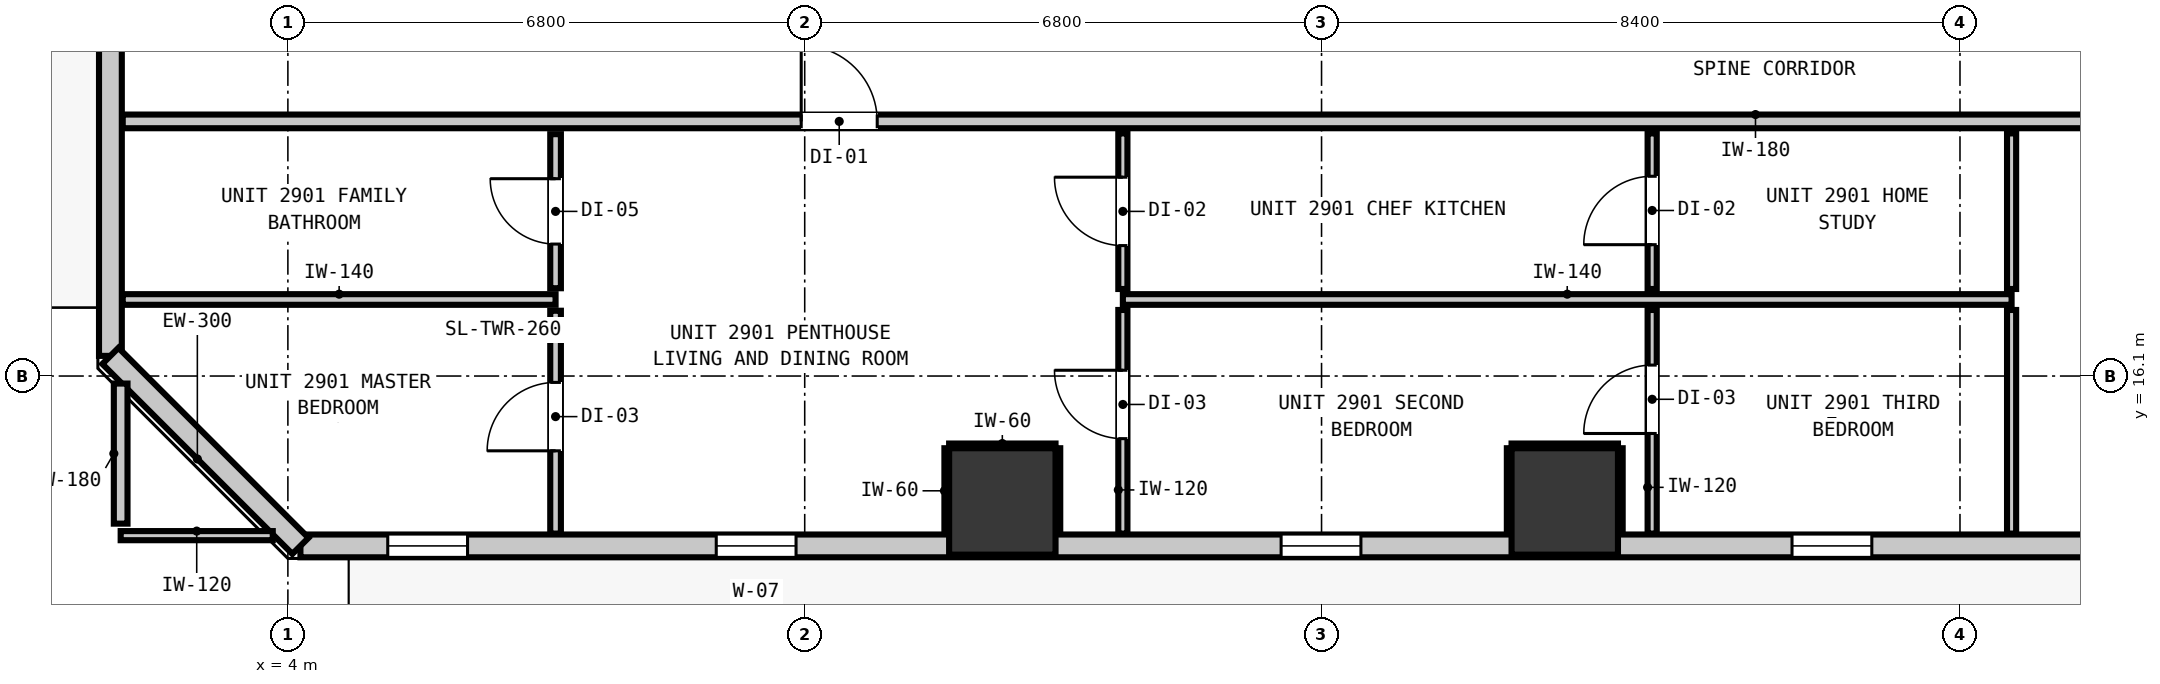
"""IFC4 building model, lengths in metres.
Left out: names, types, materials, properties, quantities, classifications, styles, units other than length and angle.
Written with IfcOpenShell. Run it as: python <this file> out.ifc"""

import sys

from ifc_helpers import new_model, si_unit, direction, frame, frame_2d, origin, origin_2d, place, context, subcontext, project, spatial, rectangle, extrude, element, fill, save


model = new_model("IFC4")
c1 = context("Model", 3, precision=1e-05, world=origin(), true_north=direction((0.0, 1.0)))
c2 = subcontext(c1, "Body", "Model", "MODEL_VIEW")
j1 = project(units=[si_unit("LENGTHUNIT", "METRE"), si_unit("PLANEANGLEUNIT", "RADIAN")], contexts=[c1])
p1 = place(None, origin())
s1 = spatial("IfcSite", under=j1, at=p1, CompositionType="ELEMENT")
p2 = place(p1, origin())
s2 = spatial("IfcBuilding", under=s1, at=p2, CompositionType="ELEMENT")
p3 = place(p2, frame((0.0, 0.0, 102.76)))
s3 = spatial("IfcBuildingStorey", under=s2, at=p3, CompositionType="ELEMENT", Elevation=102.76)
for number, where, z_axis, x_axis in (
    (1, (13.4, 14.45, 0.0), (0.0, 0.0, 1.0), (1.0, 0.0, 0.0)),
    (2, (20.8, 14.45, 0.0), (0.0, 0.0, 1.0), (1.0, 0.0, 0.0)),
):
    element("IfcColumn", number, at=place(p3, frame(where, z_axis=z_axis, x_axis=x_axis)), inside=s3, PredefinedType="COLUMN", context=c2, shape_type="SweptSolid", body=[
        extrude(rectangle(XDim=1.4, YDim=1.4, at=origin_2d()), origin(), (0.0, 0.0, 1.0), 2.9),
    ])
p4 = place(p3, frame((1.665, 16.365, 0.0), z_axis=(0.0, 0.0, 1.0), x_axis=(0.0, 1.0, 0.0)))
e3 = element("IfcWall", 3, at=p4, inside=s3, PredefinedType="STANDARD", context=c2, shape_type="SweptSolid", body=[
    extrude(rectangle(XDim=34.67, YDim=0.3, at=frame_2d((17.335, 0.0))), origin(), (0.0, 0.0, 1.0), 2.9),
])
p5 = place(p4, frame((8.955, 0.0, 0.0)))
e4 = element("IfcOpeningElement", 4, at=p5, cuts=e3, PredefinedType="OPENING", context=c2, shape_type="SweptSolid", body=[
    extrude(rectangle(XDim=1.0, YDim=2.15, at=frame_2d((0.5, 1.075))), frame((0.0, 0.16, 0.0), z_axis=(0.0, -1.0, 0.0), x_axis=(1.0, 0.0, 0.0)), (0.0, 0.0, 1.0), 0.32),
])
p6 = place(p4, frame((30.958, 0.0, 0.85)))
e5 = element("IfcOpeningElement", 5, at=p6, cuts=e3, PredefinedType="OPENING", context=c2, shape_type="SweptSolid", body=[
    extrude(rectangle(XDim=1.05, YDim=1.65, at=frame_2d((0.525, 0.825))), frame((0.0, 0.16, 0.0), z_axis=(0.0, -1.0, 0.0), x_axis=(1.0, 0.0, 0.0)), (0.0, 0.0, 1.0), 0.32),
])
p7 = place(p4, frame((10.88, 0.0, 0.85)))
e6 = element("IfcOpeningElement", 6, at=p7, cuts=e3, PredefinedType="OPENING", context=c2, shape_type="SweptSolid", body=[
    extrude(rectangle(XDim=1.05, YDim=1.65, at=frame_2d((0.525, 0.825))), frame((0.0, 0.16, 0.0), z_axis=(0.0, -1.0, 0.0), x_axis=(1.0, 0.0, 0.0)), (0.0, 0.0, 1.0), 0.32),
])
p8 = place(p4, frame((15.41, 0.0, 0.85)))
e7 = element("IfcOpeningElement", 7, at=p8, cuts=e3, PredefinedType="OPENING", context=c2, shape_type="SweptSolid", body=[
    extrude(rectangle(XDim=1.05, YDim=1.65, at=frame_2d((0.525, 0.825))), frame((0.0, 0.16, 0.0), z_axis=(0.0, -1.0, 0.0), x_axis=(1.0, 0.0, 0.0)), (0.0, 0.0, 1.0), 0.32),
])
p9 = place(p3, frame((41.635, 13.865, 0.0), z_axis=(0.0, 0.0, 1.0), x_axis=(-1.0, 0.0, 0.0)))
e8 = element("IfcWall", 8, at=p9, inside=s3, PredefinedType="STANDARD", context=c2, shape_type="SweptSolid", body=[
    extrude(rectangle(XDim=37.47, YDim=0.3, at=frame_2d((18.735, 0.0))), origin(), (0.0, 0.0, 1.0), 2.9),
])
p10 = place(p9, frame((0.901, 0.0, 0.0)))
e9 = element("IfcOpeningElement", 9, at=p10, cuts=e8, PredefinedType="OPENING", context=c2, shape_type="SweptSolid", body=[
    extrude(rectangle(XDim=1.0, YDim=2.15, at=frame_2d((0.5, 1.075))), frame((0.0, 0.16, 0.0), z_axis=(0.0, -1.0, 0.0), x_axis=(1.0, 0.0, 0.0)), (0.0, 0.0, 1.0), 0.32),
])
p11 = place(p9, frame((30.949, 0.0, 0.85)))
e10 = element("IfcOpeningElement", 10, at=p11, cuts=e8, PredefinedType="OPENING", context=c2, shape_type="SweptSolid", body=[
    extrude(rectangle(XDim=1.05, YDim=1.65, at=frame_2d((0.525, 0.825))), frame((0.0, 0.16, 0.0), z_axis=(0.0, -1.0, 0.0), x_axis=(1.0, 0.0, 0.0)), (0.0, 0.0, 1.0), 0.32),
])
p12 = place(p9, frame((35.271, 0.0, 0.85)))
e11 = element("IfcOpeningElement", 11, at=p12, cuts=e8, PredefinedType="OPENING", context=c2, shape_type="SweptSolid", body=[
    extrude(rectangle(XDim=1.05, YDim=1.65, at=frame_2d((0.525, 0.825))), frame((0.0, 0.16, 0.0), z_axis=(0.0, -1.0, 0.0), x_axis=(1.0, 0.0, 0.0)), (0.0, 0.0, 1.0), 0.32),
])
p13 = place(p9, frame((23.517, 0.0, 0.85)))
e12 = element("IfcOpeningElement", 12, at=p13, cuts=e8, PredefinedType="OPENING", context=c2, shape_type="SweptSolid", body=[
    extrude(rectangle(XDim=1.05, YDim=1.65, at=frame_2d((0.525, 0.825))), frame((0.0, 0.16, 0.0), z_axis=(0.0, -1.0, 0.0), x_axis=(1.0, 0.0, 0.0)), (0.0, 0.0, 1.0), 0.32),
])
p14 = place(p9, frame((16.795, 0.0, 0.85)))
e13 = element("IfcOpeningElement", 13, at=p14, cuts=e8, PredefinedType="OPENING", context=c2, shape_type="SweptSolid", body=[
    extrude(rectangle(XDim=1.05, YDim=1.65, at=frame_2d((0.525, 0.825))), frame((0.0, 0.16, 0.0), z_axis=(0.0, -1.0, 0.0), x_axis=(1.0, 0.0, 0.0)), (0.0, 0.0, 1.0), 0.32),
])
p15 = place(p9, frame((8.26, 0.0, 0.85)))
e14 = element("IfcOpeningElement", 14, at=p15, cuts=e8, PredefinedType="OPENING", context=c2, shape_type="SweptSolid", body=[
    extrude(rectangle(XDim=1.05, YDim=1.65, at=frame_2d((0.525, 0.825))), frame((0.0, 0.16, 0.0), z_axis=(0.0, -1.0, 0.0), x_axis=(1.0, 0.0, 0.0)), (0.0, 0.0, 1.0), 0.32),
])
p16 = place(p3, frame((4.165, 13.865, 0.0), z_axis=(0.0, 0.0, 1.0), x_axis=(-0.707106781187, 0.707106781187, 0.0)))
e15 = element("IfcWall", 15, at=p16, inside=s3, PredefinedType="STANDARD", context=c2, shape_type="SweptSolid", body=[
    extrude(rectangle(XDim=3.536, YDim=0.3, at=frame_2d((1.768, 0.0))), origin(), (0.0, 0.0, 1.0), 2.9),
])
p17 = place(p3, frame((1.827, 19.45, 0.0), z_axis=(0.0, 0.0, 1.0), x_axis=(1.0, 0.0, 0.0)))
e16 = element("IfcWall", 16, at=p17, inside=s3, PredefinedType="PARTITIONING", context=c2, shape_type="SweptSolid", body=[
    extrude(rectangle(XDim=42.146, YDim=0.18, at=frame_2d((21.073, 0.0))), origin(), (0.0, 0.0, 1.0), 2.9),
])
p18 = place(p17, frame((8.927, 0.0, 0.0)))
e17 = element("IfcOpeningElement", 17, at=p18, cuts=e16, PredefinedType="OPENING", context=c2, shape_type="SweptSolid", body=[
    extrude(rectangle(XDim=1.0, YDim=2.15, at=frame_2d((0.5, 1.075))), frame((0.0, 0.1, 0.0), z_axis=(0.0, -1.0, 0.0), x_axis=(1.0, 0.0, 0.0)), (0.0, 0.0, 1.0), 0.2),
])
p19 = place(p17, frame((33.038, 0.0, 0.0)))
e18 = element("IfcOpeningElement", 18, at=p19, cuts=e16, PredefinedType="OPENING", context=c2, shape_type="SweptSolid", body=[
    extrude(rectangle(XDim=0.9, YDim=2.1, at=frame_2d((0.45, 1.05))), frame((0.0, 0.1, 0.0), z_axis=(0.0, -1.0, 0.0), x_axis=(1.0, 0.0, 0.0)), (0.0, 0.0, 1.0), 0.2),
])
p20 = place(p3, frame((1.827, 17.107, 0.0), z_axis=(0.0, 0.0, 1.0), x_axis=(1.0, 0.0, 0.0)))
e19 = element("IfcWall", 19, at=p20, inside=s3, PredefinedType="PARTITIONING", context=c2, shape_type="SweptSolid", body=[
    extrude(rectangle(XDim=5.695, YDim=0.14, at=frame_2d((2.848, 0.0))), origin(), (0.0, 0.0, 1.0), 2.9),
])
p21 = place(p3, frame((14.986, 17.107, 0.0), z_axis=(0.0, 0.0, 1.0), x_axis=(1.0, 0.0, 0.0)))
e20 = element("IfcWall", 20, at=p21, inside=s3, PredefinedType="PARTITIONING", context=c2, shape_type="SweptSolid", body=[
    extrude(rectangle(XDim=11.693, YDim=0.14, at=frame_2d((5.846, 0.0))), origin(), (0.0, 0.0, 1.0), 2.9),
])
p22 = place(p3, frame((1.8, 14.0, 0.0), z_axis=(0.0, 0.0, 1.0), x_axis=(1.0, 0.0, 0.0)))
e21 = element("IfcWall", 21, at=p22, inside=s3, PredefinedType="PARTITIONING", context=c2, shape_type="SweptSolid", body=[
    extrude(rectangle(XDim=2.001, YDim=0.12, at=frame_2d((1.0, 0.0))), origin(), (0.0, 0.0, 1.0), 2.9),
])
p23 = place(p3, frame((1.8, 14.158, 0.0), z_axis=(0.0, 0.0, 1.0), x_axis=(0.0, 1.0, 0.0)))
e22 = element("IfcWall", 22, at=p23, inside=s3, PredefinedType="PARTITIONING", context=c2, shape_type="SweptSolid", body=[
    extrude(rectangle(XDim=1.843, YDim=0.18, at=frame_2d((0.921, 0.0))), origin(), (0.0, 0.0, 1.0), 2.9),
])
p24 = place(p3, frame((7.522, 14.027, 0.0), z_axis=(0.0, 0.0, 1.0), x_axis=(0.0, 1.0, 0.0)))
e23 = element("IfcWall", 23, at=p24, inside=s3, PredefinedType="PARTITIONING", context=c2, shape_type="SweptSolid", body=[
    extrude(rectangle(XDim=2.932, YDim=0.14, at=frame_2d((1.466, 0.0))), origin(), (0.0, 0.0, 1.0), 2.9),
])
p25 = place(p24, frame((1.089, 0.0, 0.0)))
e24 = element("IfcOpeningElement", 24, at=p25, cuts=e23, PredefinedType="OPENING", context=c2, shape_type="SweptSolid", body=[
    extrude(rectangle(XDim=0.9, YDim=2.1, at=frame_2d((0.45, 1.05))), frame((0.0, 0.08, 0.0), z_axis=(0.0, -1.0, 0.0), x_axis=(1.0, 0.0, 0.0)), (0.0, 0.0, 1.0), 0.16),
])
p26 = place(p3, frame((7.522, 17.255, 0.0), z_axis=(0.0, 0.0, 1.0), x_axis=(0.0, 1.0, 0.0)))
e25 = element("IfcWall", 25, at=p26, inside=s3, PredefinedType="PARTITIONING", context=c2, shape_type="SweptSolid", body=[
    extrude(rectangle(XDim=2.027, YDim=0.14, at=frame_2d((1.014, 0.0))), origin(), (0.0, 0.0, 1.0), 2.9),
])
p27 = place(p26, frame((0.581, 0.0, 0.0)))
e26 = element("IfcOpeningElement", 26, at=p27, cuts=e25, PredefinedType="OPENING", context=c2, shape_type="SweptSolid", body=[
    extrude(rectangle(XDim=0.86, YDim=2.02, at=frame_2d((0.43, 1.01))), frame((0.0, 0.08, 0.0), z_axis=(0.0, -1.0, 0.0), x_axis=(1.0, 0.0, 0.0)), (0.0, 0.0, 1.0), 0.16),
])
p28 = place(p3, frame((14.986, 14.027, 0.0), z_axis=(0.0, 0.0, 1.0), x_axis=(0.0, 1.0, 0.0)))
e27 = element("IfcWall", 27, at=p28, inside=s3, PredefinedType="PARTITIONING", context=c2, shape_type="SweptSolid", body=[
    extrude(rectangle(XDim=2.942, YDim=0.12, at=frame_2d((1.471, 0.0))), origin(), (0.0, 0.0, 1.0), 2.9),
])
p29 = place(p28, frame((1.249, 0.0, 0.0)))
e28 = element("IfcOpeningElement", 28, at=p29, cuts=e27, PredefinedType="OPENING", context=c2, shape_type="SweptSolid", body=[
    extrude(rectangle(XDim=0.9, YDim=2.1, at=frame_2d((0.45, 1.05))), frame((0.0, 0.07, 0.0), z_axis=(0.0, -1.0, 0.0), x_axis=(1.0, 0.0, 0.0)), (0.0, 0.0, 1.0), 0.14),
])
p30 = place(p3, frame((14.986, 17.245, 0.0), z_axis=(0.0, 0.0, 1.0), x_axis=(0.0, 1.0, 0.0)))
e29 = element("IfcWall", 29, at=p30, inside=s3, PredefinedType="PARTITIONING", context=c2, shape_type="SweptSolid", body=[
    extrude(rectangle(XDim=2.047, YDim=0.12, at=frame_2d((1.023, 0.0))), origin(), (0.0, 0.0, 1.0), 2.9),
])
p31 = place(p30, frame((0.571, 0.0, 0.0)))
e30 = element("IfcOpeningElement", 30, at=p31, cuts=e29, PredefinedType="OPENING", context=c2, shape_type="SweptSolid", body=[
    extrude(rectangle(XDim=0.9, YDim=2.1, at=frame_2d((0.45, 1.05))), frame((0.0, 0.07, 0.0), z_axis=(0.0, -1.0, 0.0), x_axis=(1.0, 0.0, 0.0)), (0.0, 0.0, 1.0), 0.14),
])
p32 = place(p3, frame((21.95, 14.027, 0.0), z_axis=(0.0, 0.0, 1.0), x_axis=(0.0, 1.0, 0.0)))
e31 = element("IfcWall", 31, at=p32, inside=s3, PredefinedType="PARTITIONING", context=c2, shape_type="SweptSolid", body=[
    extrude(rectangle(XDim=2.942, YDim=0.12, at=frame_2d((1.471, 0.0))), origin(), (0.0, 0.0, 1.0), 2.9),
])
p33 = place(p32, frame((1.317, 0.0, 0.0)))
e32 = element("IfcOpeningElement", 32, at=p33, cuts=e31, PredefinedType="OPENING", context=c2, shape_type="SweptSolid", body=[
    extrude(rectangle(XDim=0.9, YDim=2.1, at=frame_2d((0.45, 1.05))), frame((0.0, 0.07, 0.0), z_axis=(0.0, -1.0, 0.0), x_axis=(1.0, 0.0, 0.0)), (0.0, 0.0, 1.0), 0.14),
])
p34 = place(p3, frame((21.95, 17.245, 0.0), z_axis=(0.0, 0.0, 1.0), x_axis=(0.0, 1.0, 0.0)))
e33 = element("IfcWall", 33, at=p34, inside=s3, PredefinedType="PARTITIONING", context=c2, shape_type="SweptSolid", body=[
    extrude(rectangle(XDim=2.047, YDim=0.12, at=frame_2d((1.023, 0.0))), origin(), (0.0, 0.0, 1.0), 2.9),
])
p35 = place(p34, frame((0.583, 0.0, 0.0)))
e34 = element("IfcOpeningElement", 34, at=p35, cuts=e33, PredefinedType="OPENING", context=c2, shape_type="SweptSolid", body=[
    extrude(rectangle(XDim=0.9, YDim=2.1, at=frame_2d((0.45, 1.05))), frame((0.0, 0.07, 0.0), z_axis=(0.0, -1.0, 0.0), x_axis=(1.0, 0.0, 0.0)), (0.0, 0.0, 1.0), 0.14),
])
p36 = place(p3, frame((26.679, 14.027, 0.0), z_axis=(0.0, 0.0, 1.0), x_axis=(0.0, 1.0, 0.0)))
e35 = element("IfcWall", 35, at=p36, inside=s3, PredefinedType="PARTITIONING", context=c2, shape_type="SweptSolid", body=[
    extrude(rectangle(XDim=2.942, YDim=0.12, at=frame_2d((1.471, 0.0))), origin(), (0.0, 0.0, 1.0), 2.9),
])
p37 = place(p3, frame((26.679, 17.245, 0.0), z_axis=(0.0, 0.0, 1.0), x_axis=(0.0, 1.0, 0.0)))
e36 = element("IfcWall", 36, at=p37, inside=s3, PredefinedType="PARTITIONING", context=c2, shape_type="SweptSolid", body=[
    extrude(rectangle(XDim=2.047, YDim=0.12, at=frame_2d((1.023, 0.0))), origin(), (0.0, 0.0, 1.0), 2.9),
])
p38 = place(p3, frame((12.7, 15.182, 0.0), z_axis=(0.0, 0.0, 1.0), x_axis=(1.0, 0.0, 0.0)))
e37 = element("IfcWall", 37, at=p38, inside=s3, PredefinedType="PARTITIONING", context=c2, shape_type="SweptSolid", body=[
    extrude(rectangle(XDim=1.4, YDim=0.06, at=frame_2d((0.7, 0.0))), origin(), (0.0, 0.0, 1.0), 1.45),
])
for number, where, z_axis, x_axis in (
    (38, (12.668, 14.03, 0.0), (0.0, 0.0, 1.0), (0.0, 1.0, 0.0)),
    (39, (14.132, 14.03, 0.0), (0.0, 0.0, 1.0), (0.0, 1.0, 0.0)),
):
    element("IfcWall", number, at=place(p3, frame(where, z_axis=z_axis, x_axis=x_axis)), inside=s3, PredefinedType="PARTITIONING", context=c2, shape_type="SweptSolid", body=[
        extrude(rectangle(XDim=1.12, YDim=0.06, at=frame_2d((0.56, 0.0))), origin(), (0.0, 0.0, 1.0), 1.45),
    ])
p39 = place(p3, frame((20.1, 15.182, 0.0), z_axis=(0.0, 0.0, 1.0), x_axis=(1.0, 0.0, 0.0)))
e40 = element("IfcWall", 40, at=p39, inside=s3, PredefinedType="PARTITIONING", context=c2, shape_type="SweptSolid", body=[
    extrude(rectangle(XDim=1.4, YDim=0.06, at=frame_2d((0.7, 0.0))), origin(), (0.0, 0.0, 1.0), 1.45),
])
for number, where, z_axis, x_axis in (
    (41, (20.068, 14.03, 0.0), (0.0, 0.0, 1.0), (0.0, 1.0, 0.0)),
    (42, (21.532, 14.03, 0.0), (0.0, 0.0, 1.0), (0.0, 1.0, 0.0)),
):
    element("IfcWall", number, at=place(p3, frame(where, z_axis=z_axis, x_axis=x_axis)), inside=s3, PredefinedType="PARTITIONING", context=c2, shape_type="SweptSolid", body=[
        extrude(rectangle(XDim=1.12, YDim=0.06, at=frame_2d((0.56, 0.0))), origin(), (0.0, 0.0, 1.0), 1.45),
    ])
p40 = place(p11, origin())
e43 = element("IfcWindow", 43, at=p40, inside=s3, PartitioningType="SINGLE_PANEL", PredefinedType="WINDOW", context=c2, shape_type="SweptSolid", body=[
    extrude(rectangle(XDim=1.05, YDim=1.65, at=frame_2d((0.525, 0.825))), frame((0.0, 0.03, 0.0), z_axis=(0.0, -1.0, 0.0), x_axis=(1.0, 0.0, 0.0)), (0.0, 0.0, 1.0), 0.06),
])
fill(e10, e43)
p41 = place(p12, origin())
e44 = element("IfcWindow", 44, at=p41, inside=s3, PartitioningType="SINGLE_PANEL", PredefinedType="WINDOW", context=c2, shape_type="SweptSolid", body=[
    extrude(rectangle(XDim=1.05, YDim=1.65, at=frame_2d((0.525, 0.825))), frame((0.0, 0.03, 0.0), z_axis=(0.0, -1.0, 0.0), x_axis=(1.0, 0.0, 0.0)), (0.0, 0.0, 1.0), 0.06),
])
fill(e11, e44)
p42 = place(p13, origin())
e45 = element("IfcWindow", 45, at=p42, inside=s3, PartitioningType="SINGLE_PANEL", PredefinedType="WINDOW", context=c2, shape_type="SweptSolid", body=[
    extrude(rectangle(XDim=1.05, YDim=1.65, at=frame_2d((0.525, 0.825))), frame((0.0, 0.03, 0.0), z_axis=(0.0, -1.0, 0.0), x_axis=(1.0, 0.0, 0.0)), (0.0, 0.0, 1.0), 0.06),
])
fill(e12, e45)
p43 = place(p14, origin())
e46 = element("IfcWindow", 46, at=p43, inside=s3, PartitioningType="SINGLE_PANEL", PredefinedType="WINDOW", context=c2, shape_type="SweptSolid", body=[
    extrude(rectangle(XDim=1.05, YDim=1.65, at=frame_2d((0.525, 0.825))), frame((0.0, 0.03, 0.0), z_axis=(0.0, -1.0, 0.0), x_axis=(1.0, 0.0, 0.0)), (0.0, 0.0, 1.0), 0.06),
])
fill(e13, e46)
p44 = place(p18, origin())
e47 = element("IfcDoor", 47, at=p44, inside=s3, OperationType="SINGLE_SWING_LEFT", PredefinedType="DOOR", context=c2, shape_type="SweptSolid", body=[
    extrude(rectangle(XDim=1.0, YDim=2.15, at=frame_2d((0.5, 1.075))), frame((0.0, 0.025, 0.0), z_axis=(0.0, -1.0, 0.0), x_axis=(1.0, 0.0, 0.0)), (0.0, 0.0, 1.0), 0.05),
])
fill(e17, e47)
p45 = place(p27, origin())
e48 = element("IfcDoor", 48, at=p45, inside=s3, OperationType="SINGLE_SWING_RIGHT", PredefinedType="DOOR", context=c2, shape_type="SweptSolid", body=[
    extrude(rectangle(XDim=0.86, YDim=2.02, at=frame_2d((0.43, 1.01))), frame((0.0, 0.025, 0.0), z_axis=(0.0, -1.0, 0.0), x_axis=(1.0, 0.0, 0.0)), (0.0, 0.0, 1.0), 0.05),
])
fill(e26, e48)
p46 = place(p25, origin())
e49 = element("IfcDoor", 49, at=p46, inside=s3, OperationType="SINGLE_SWING_LEFT", PredefinedType="DOOR", context=c2, shape_type="SweptSolid", body=[
    extrude(rectangle(XDim=0.9, YDim=2.1, at=frame_2d((0.45, 1.05))), frame((0.0, 0.025, 0.0), z_axis=(0.0, -1.0, 0.0), x_axis=(1.0, 0.0, 0.0)), (0.0, 0.0, 1.0), 0.05),
])
fill(e24, e49)
p47 = place(p31, origin())
e50 = element("IfcDoor", 50, at=p47, inside=s3, OperationType="SINGLE_SWING_RIGHT", PredefinedType="DOOR", context=c2, shape_type="SweptSolid", body=[
    extrude(rectangle(XDim=0.9, YDim=2.1, at=frame_2d((0.45, 1.05))), frame((0.0, 0.025, 0.0), z_axis=(0.0, -1.0, 0.0), x_axis=(1.0, 0.0, 0.0)), (0.0, 0.0, 1.0), 0.05),
])
fill(e30, e50)
p48 = place(p35, origin())
e51 = element("IfcDoor", 51, at=p48, inside=s3, OperationType="SINGLE_SWING_LEFT", PredefinedType="DOOR", context=c2, shape_type="SweptSolid", body=[
    extrude(rectangle(XDim=0.9, YDim=2.1, at=frame_2d((0.45, 1.05))), frame((0.0, 0.025, 0.0), z_axis=(0.0, -1.0, 0.0), x_axis=(1.0, 0.0, 0.0)), (0.0, 0.0, 1.0), 0.05),
])
fill(e34, e51)
p49 = place(p29, origin())
e52 = element("IfcDoor", 52, at=p49, inside=s3, OperationType="SINGLE_SWING_RIGHT", PredefinedType="DOOR", context=c2, shape_type="SweptSolid", body=[
    extrude(rectangle(XDim=0.9, YDim=2.1, at=frame_2d((0.45, 1.05))), frame((0.0, 0.025, 0.0), z_axis=(0.0, -1.0, 0.0), x_axis=(1.0, 0.0, 0.0)), (0.0, 0.0, 1.0), 0.05),
])
fill(e28, e52)
p50 = place(p33, origin())
e53 = element("IfcDoor", 53, at=p50, inside=s3, OperationType="SINGLE_SWING_LEFT", PredefinedType="DOOR", context=c2, shape_type="SweptSolid", body=[
    extrude(rectangle(XDim=0.9, YDim=2.1, at=frame_2d((0.45, 1.05))), frame((0.0, 0.025, 0.0), z_axis=(0.0, -1.0, 0.0), x_axis=(1.0, 0.0, 0.0)), (0.0, 0.0, 1.0), 0.05),
])
fill(e32, e53)
save(model, sys.argv[1])
